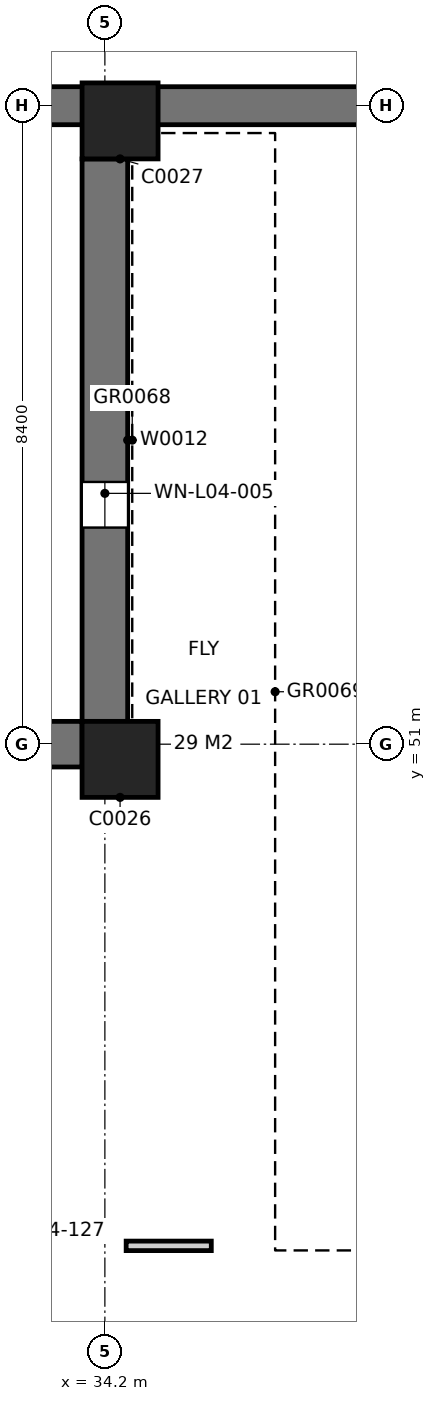
"""IFC4 building model, lengths in metres.
Left out: names, types, materials, properties, quantities, classifications, styles, units other than length and angle.
Written with IfcOpenShell. Run it as: python <this file> out.ifc"""

import sys

from ifc_helpers import new_model, si_unit, direction, frame, frame_2d, origin, origin_2d, place, context, subcontext, project, spatial, rectangle, extrude, element, fill, save


model = new_model("IFC4")
c1 = context("Model", 3, precision=1e-05, world=origin(), true_north=direction((0.0, 1.0)))
c2 = subcontext(c1, "Body", "Model", "MODEL_VIEW")
j1 = project(units=[si_unit("LENGTHUNIT", "METRE"), si_unit("PLANEANGLEUNIT", "RADIAN")], contexts=[c1])
p1 = place(None, origin())
s1 = spatial("IfcSite", under=j1, at=p1, CompositionType="ELEMENT")
p2 = place(p1, origin())
s2 = spatial("IfcBuilding", under=s1, at=p2, CompositionType="ELEMENT")
p3 = place(p2, frame((0.0, 0.0, 19.2)))
s3 = spatial("IfcBuildingStorey", under=s2, at=p3, CompositionType="ELEMENT", Elevation=19.2)
p4 = place(p3, frame((26.153, 59.4, 0.0), z_axis=(0.0, 0.0, 1.0), x_axis=(1.0, 0.0, 0.0)))
e1 = element("IfcWall", 1, at=p4, inside=s3, PredefinedType="SOLIDWALL", context=c2, shape_type="SweptSolid", body=[
    extrude(rectangle(XDim=32.894, YDim=0.5, at=frame_2d((16.447, 0.0))), origin(), (0.0, 0.0, 1.0), 4.8),
])
for number, where, z_axis, x_axis in (
    (2, (34.4, 50.8, 0.0), (0.0, 0.0, 1.0), (1.0, 0.0, 0.0)),
    (3, (34.4, 59.2, 0.0), (0.0, 0.0, 1.0), (1.0, 0.0, 0.0)),
):
    element("IfcColumn", number, at=place(p3, frame(where, z_axis=z_axis, x_axis=x_axis)), inside=s3, PredefinedType="COLUMN", context=c2, shape_type="SweptSolid", body=[
        extrude(rectangle(XDim=1.0, YDim=1.0, at=origin_2d()), origin(), (0.0, 0.0, 1.0), 4.8),
    ])
p5 = place(p3, frame((34.2, 58.7, 0.0), z_axis=(0.0, 0.0, 1.0), x_axis=(0.0, -1.0, 0.0)))
e4 = element("IfcWall", 4, at=p5, inside=s3, PredefinedType="SOLIDWALL", context=c2, shape_type="SweptSolid", body=[
    extrude(rectangle(XDim=7.4, YDim=0.6, at=frame_2d((3.7, 0.0))), origin(), (0.0, 0.0, 1.0), 4.8),
])
p6 = place(p5, frame((4.25, 0.0, 1.5)))
e5 = element("IfcOpeningElement", 5, at=p6, cuts=e4, PredefinedType="OPENING", context=c2, shape_type="SweptSolid", body=[
    extrude(rectangle(XDim=0.6, YDim=1.8, at=frame_2d((0.3, 0.9))), frame((0.0, 0.31, 0.0), z_axis=(0.0, -1.0, 0.0), x_axis=(1.0, 0.0, 0.0)), (0.0, 0.0, 1.0), 0.62),
])
p7 = place(p3, frame((33.9, 51.0, 0.0), z_axis=(0.0, 0.0, 1.0), x_axis=(-1.0, 0.0, 0.0)))
e6 = element("IfcWall", 6, at=p7, inside=s3, PredefinedType="SOLIDWALL", context=c2, shape_type="SweptSolid", body=[
    extrude(rectangle(XDim=7.4, YDim=0.6, at=frame_2d((3.7, 0.0))), origin(), (0.0, 0.0, 1.0), 4.8),
])
p8 = place(p7, frame((2.55, 0.0, 1.5)))
e7 = element("IfcOpeningElement", 7, at=p8, cuts=e6, PredefinedType="OPENING", context=c2, shape_type="SweptSolid", body=[
    extrude(rectangle(XDim=0.6, YDim=1.8, at=frame_2d((0.3, 0.9))), frame((0.0, 0.31, 0.0), z_axis=(0.0, -1.0, 0.0), x_axis=(1.0, 0.0, 0.0)), (0.0, 0.0, 1.0), 0.62),
])
p9 = place(p3, frame((34.48, 44.4, 0.0), z_axis=(0.0, 0.0, 1.0), x_axis=(1.0, 0.0, 0.0)))
e8 = element("IfcWall", 8, at=p9, inside=s3, PredefinedType="PARTITIONING", context=c2, shape_type="SweptSolid", body=[
    extrude(rectangle(XDim=1.12, YDim=0.125, at=frame_2d((0.56, 0.0))), origin(), (0.0, 0.0, 1.0), 4.52),
])
p10 = place(p6, origin())
e9 = element("IfcWindow", 9, at=p10, inside=s3, PartitioningType="SINGLE_PANEL", PredefinedType="WINDOW", context=c2, shape_type="SweptSolid", body=[
    extrude(rectangle(XDim=0.6, YDim=1.8, at=frame_2d((0.3, 0.9))), frame((0.0, 0.01, 0.0), z_axis=(0.0, -1.0, 0.0), x_axis=(1.0, 0.0, 0.0)), (0.0, 0.0, 1.0), 0.06),
])
fill(e5, e9)
save(model, sys.argv[1])
